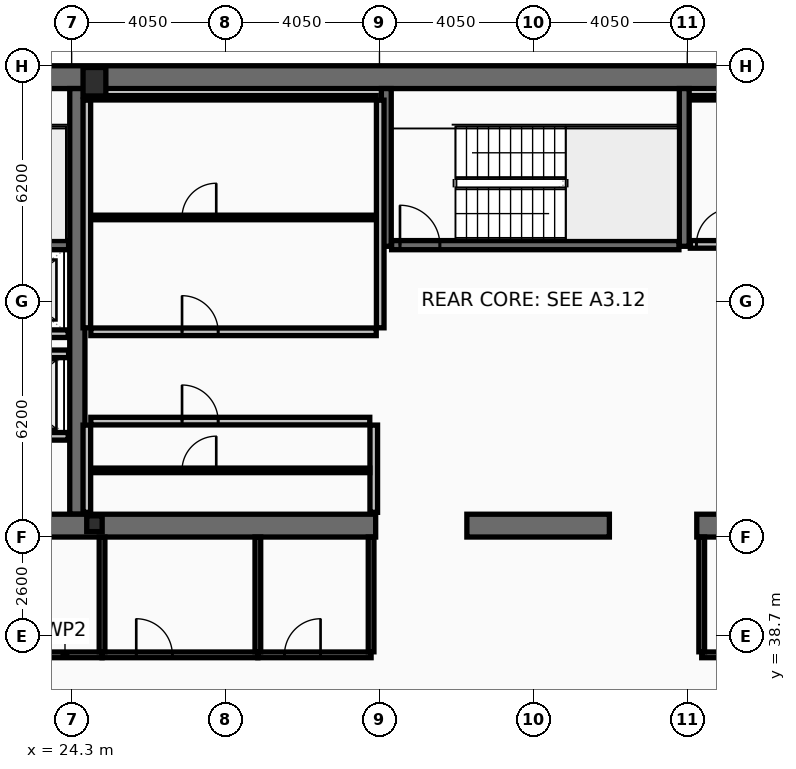
"""IFC4 building model, lengths in metres.
Left out: names, types, materials, properties, quantities, classifications, styles, units other than length and angle.
Written with IfcOpenShell. Run it as: python <this file> out.ifc"""

import sys

from ifc_helpers import new_model, si_unit, direction, frame, frame_2d, origin, origin_2d, place, context, subcontext, project, spatial, rectangle, hollow_rectangle, i_section, extrude, element, fill, save


model = new_model("IFC4")
c1 = context("Model", 3, precision=1e-05, world=origin(), true_north=direction((0.0, 1.0)))
c2 = subcontext(c1, "Body", "Model", "MODEL_VIEW")
j1 = project(units=[si_unit("LENGTHUNIT", "METRE"), si_unit("PLANEANGLEUNIT", "RADIAN")], contexts=[c1])
p1 = place(None, origin())
s1 = spatial("IfcSite", under=j1, at=p1, CompositionType="ELEMENT")
p2 = place(p1, origin())
s2 = spatial("IfcBuilding", under=s1, at=p2, CompositionType="ELEMENT")
p3 = place(p2, frame((0.0, 0.0, 210.2)))
s3 = spatial("IfcBuildingStorey", under=s2, at=p3, CompositionType="ELEMENT", Elevation=210.2)
p4 = place(p3, frame((16.2, 53.4, 0.0), z_axis=(0.0, 0.0, 1.0), x_axis=(1.0, 0.0, 0.0)))
e1 = element("IfcWall", 1, at=p4, inside=s3, PredefinedType="SHEAR", context=c2, shape_type="SweptSolid", body=[
    extrude(rectangle(XDim=40.5, YDim=0.6, at=frame_2d((20.25, 0.0))), origin(), (0.0, 0.0, 1.0), 3.44),
])
p5 = place(p3, frame((24.45, 41.9, 0.0), z_axis=(0.0, 0.0, 1.0), x_axis=(0.0, 1.0, 0.0)))
e2 = element("IfcWall", 2, at=p5, inside=s3, PredefinedType="SHEAR", context=c2, shape_type="SweptSolid", body=[
    extrude(rectangle(XDim=11.2, YDim=0.4, at=frame_2d((5.6, 0.0))), origin(), (0.0, 0.0, 1.0), 3.44),
])
p6 = place(p3, frame((32.3, 41.6, 0.0), z_axis=(0.0, 0.0, 1.0), x_axis=(-1.0, 0.0, 0.0)))
e3 = element("IfcWall", 3, at=p6, inside=s3, PredefinedType="SHEAR", context=c2, shape_type="SweptSolid", body=[
    extrude(rectangle(XDim=11.45, YDim=0.6, at=frame_2d((5.725, 0.0))), origin(), (0.0, 0.0, 1.0), 3.44),
])
p7 = place(p3, frame((38.45, 41.6, 0.0), z_axis=(0.0, 0.0, 1.0), x_axis=(-1.0, 0.0, 0.0)))
e4 = element("IfcWall", 4, at=p7, inside=s3, PredefinedType="SHEAR", context=c2, shape_type="SweptSolid", body=[
    extrude(rectangle(XDim=3.75, YDim=0.6, at=frame_2d((1.875, 0.0))), origin(), (0.0, 0.0, 1.0), 3.44),
])
p8 = place(p3, frame((52.05, 41.6, 0.0), z_axis=(0.0, 0.0, 1.0), x_axis=(-1.0, 0.0, 0.0)))
e5 = element("IfcWall", 5, at=p8, inside=s3, PredefinedType="SHEAR", context=c2, shape_type="SweptSolid", body=[
    extrude(rectangle(XDim=11.3, YDim=0.6, at=frame_2d((5.65, 0.0))), origin(), (0.0, 0.0, 1.0), 3.44),
])
for number, where, z_axis, x_axis in (
    (6, (32.58, 48.95, 0.0), (0.0, 0.0, 1.0), (0.0, 1.0, 0.0)),
    (7, (40.42, 48.95, 0.0), (0.0, 0.0, 1.0), (0.0, 1.0, 0.0)),
):
    element("IfcWall", number, at=place(p3, frame(where, z_axis=z_axis, x_axis=x_axis)), inside=s3, PredefinedType="SHEAR", context=c2, shape_type="SweptSolid", body=[
        extrude(rectangle(XDim=4.15, YDim=0.26, at=frame_2d((2.075, 0.0))), origin(), (0.0, 0.0, 1.0), 3.44),
    ])
p9 = place(p3, frame((16.8, 48.98, 0.0), z_axis=(0.0, 0.0, 1.0), x_axis=(1.0, 0.0, 0.0)))
e8 = element("IfcWall", 8, at=p9, inside=s3, PredefinedType="SHEAR", context=c2, shape_type="SweptSolid", body=[
    extrude(rectangle(XDim=7.42, YDim=0.24, at=frame_2d((3.71, 0.0))), origin(), (0.0, 0.0, 1.0), 3.44),
])
p10 = place(p9, frame((0.22, 0.0, 0.0)))
e9 = element("IfcOpeningElement", 9, at=p10, cuts=e8, PredefinedType="OPENING", context=c2, shape_type="SweptSolid", body=[
    extrude(rectangle(XDim=1.05, YDim=2.15, at=frame_2d((0.525, 1.075))), frame((0.0, 0.13, 0.0), z_axis=(0.0, -1.0, 0.0), x_axis=(1.0, 0.0, 0.0)), (0.0, 0.0, 1.0), 0.26),
])
p11 = place(p3, frame((32.72, 48.98, 0.0), z_axis=(0.0, 0.0, 1.0), x_axis=(1.0, 0.0, 0.0)))
e10 = element("IfcWall", 10, at=p11, inside=s3, PredefinedType="SHEAR", context=c2, shape_type="SweptSolid", body=[
    extrude(rectangle(XDim=7.56, YDim=0.24, at=frame_2d((3.78, 0.0))), origin(), (0.0, 0.0, 1.0), 3.44),
])
p12 = place(p11, frame((0.22, 0.0, 0.0)))
e11 = element("IfcOpeningElement", 11, at=p12, cuts=e10, PredefinedType="OPENING", context=c2, shape_type="SweptSolid", body=[
    extrude(rectangle(XDim=1.05, YDim=2.15, at=frame_2d((0.525, 1.075))), frame((0.0, 0.13, 0.0), z_axis=(0.0, -1.0, 0.0), x_axis=(1.0, 0.0, 0.0)), (0.0, 0.0, 1.0), 0.26),
])
p13 = place(p3, frame((24.9, 53.28, 0.0), z_axis=(0.0, 0.0, 1.0), x_axis=(1.0, 0.0, 0.0)))
e12 = element("IfcColumn", 12, at=p13, inside=s3, PredefinedType="COLUMN", context=c2, shape_type="SweptSolid", body=[
    extrude(hollow_rectangle(XDim=0.6, YDim=0.75, WallThickness=0.045, at=origin_2d()), origin(), (0.0, 0.0, 1.0), 3.6),
])
p14 = place(p3, frame((24.9, 41.65, 0.0), z_axis=(0.0, 0.0, 1.0), x_axis=(1.0, 0.0, 0.0)))
e13 = element("IfcColumn", 13, at=p14, inside=s3, PredefinedType="COLUMN", context=c2, shape_type="SweptSolid", body=[
    extrude(i_section(OverallWidth=0.406, OverallDepth=0.416, WebThickness=0.03, FlangeThickness=0.048, at=origin_2d()), origin(), (0.0, 0.0, 1.0), 3.6),
])
p15 = place(p3, frame((24.21, 43.95, 0.0), z_axis=(0.0, 0.0, 1.0), x_axis=(-1.0, 0.0, 0.0)))
e14 = element("IfcWall", 14, at=p15, inside=s3, PredefinedType="PARTITIONING", context=c2, shape_type="SweptSolid", body=[
    extrude(rectangle(XDim=2.97, YDim=0.2, at=frame_2d((1.485, 0.0))), origin(), (0.0, 0.0, 1.0), 3.44),
])
p16 = place(p15, frame((0.86, 0.0, 0.0)))
e15 = element("IfcOpeningElement", 15, at=p16, cuts=e14, PredefinedType="OPENING", context=c2, shape_type="SweptSolid", body=[
    extrude(rectangle(XDim=1.3, YDim=2.18, at=frame_2d((0.65, 1.09))), frame((0.0, 0.11, 0.0), z_axis=(0.0, -1.0, 0.0), x_axis=(1.0, 0.0, 0.0)), (0.0, 0.0, 1.0), 0.22),
])
p17 = place(p3, frame((24.21, 46.65, 0.0), z_axis=(0.0, 0.0, 1.0), x_axis=(-1.0, 0.0, 0.0)))
e16 = element("IfcWall", 16, at=p17, inside=s3, PredefinedType="PARTITIONING", context=c2, shape_type="SweptSolid", body=[
    extrude(rectangle(XDim=2.97, YDim=0.2, at=frame_2d((1.485, 0.0))), origin(), (0.0, 0.0, 1.0), 3.44),
])
p18 = place(p17, frame((0.91, 0.0, 0.0)))
e17 = element("IfcOpeningElement", 17, at=p18, cuts=e16, PredefinedType="OPENING", context=c2, shape_type="SweptSolid", body=[
    extrude(rectangle(XDim=1.2, YDim=2.18, at=frame_2d((0.6, 1.09))), frame((0.0, 0.11, 0.0), z_axis=(0.0, -1.0, 0.0), x_axis=(1.0, 0.0, 0.0)), (0.0, 0.0, 1.0), 0.22),
])
p19 = place(p3, frame((21.2, 46.12, 0.0), z_axis=(0.0, 0.0, 1.0), x_axis=(1.0, 0.0, 0.0)))
e18 = element("IfcWall", 18, at=p19, inside=s3, PredefinedType="PARTITIONING", context=c2, shape_type="SweptSolid", body=[
    extrude(rectangle(XDim=3.02, YDim=0.2, at=frame_2d((1.51, 0.0))), origin(), (0.0, 0.0, 1.0), 3.44),
])
for number, where, z_axis, x_axis in (
    (19, (24.7, 46.805, 0.0), (0.0, 0.0, 1.0), (0.0, 1.0, 0.0)),
    (20, (32.42, 46.805, 0.0), (0.0, 0.0, 1.0), (0.0, 1.0, 0.0)),
):
    element("IfcWall", number, at=place(p3, frame(where, z_axis=z_axis, x_axis=x_axis)), inside=s3, PredefinedType="PARTITIONING", context=c2, shape_type="SweptSolid", body=[
        extrude(rectangle(XDim=5.99, YDim=0.2, at=frame_2d((2.995, 0.0))), origin(), (0.0, 0.0, 1.0), 3.44),
    ])
p20 = place(p3, frame((24.805, 52.86, 0.0), z_axis=(0.0, 0.0, 1.0), x_axis=(1.0, 0.0, 0.0)))
e21 = element("IfcWall", 21, at=p20, inside=s3, PredefinedType="PARTITIONING", context=c2, shape_type="SweptSolid", body=[
    extrude(rectangle(XDim=7.51, YDim=0.12, at=frame_2d((3.755, 0.0))), origin(), (0.0, 0.0, 1.0), 3.44),
])
p21 = place(p3, frame((24.805, 49.709, 0.0), z_axis=(0.0, 0.0, 1.0), x_axis=(1.0, 0.0, 0.0)))
e22 = element("IfcWall", 22, at=p21, inside=s3, PredefinedType="PARTITIONING", context=c2, shape_type="SweptSolid", body=[
    extrude(rectangle(XDim=7.51, YDim=0.12, at=frame_2d((3.755, 0.0))), origin(), (0.0, 0.0, 1.0), 3.44),
])
p22 = place(p21, frame((2.4, 0.0, 0.0)))
e23 = element("IfcOpeningElement", 23, at=p22, cuts=e22, PredefinedType="OPENING", context=c2, shape_type="SweptSolid", body=[
    extrude(rectangle(XDim=0.9, YDim=2.05, at=frame_2d((0.45, 1.025))), frame((0.0, 0.07, 0.0), z_axis=(0.0, -1.0, 0.0), x_axis=(1.0, 0.0, 0.0)), (0.0, 0.0, 1.0), 0.14),
])
p23 = place(p3, frame((24.805, 46.7, 0.0), z_axis=(0.0, 0.0, 1.0), x_axis=(1.0, 0.0, 0.0)))
e24 = element("IfcWall", 24, at=p23, inside=s3, PredefinedType="PARTITIONING", context=c2, shape_type="SweptSolid", body=[
    extrude(rectangle(XDim=7.51, YDim=0.2, at=frame_2d((3.755, 0.0))), origin(), (0.0, 0.0, 1.0), 3.44),
])
p24 = place(p23, frame((2.4, 0.0, 0.0)))
e25 = element("IfcOpeningElement", 25, at=p24, cuts=e24, PredefinedType="OPENING", context=c2, shape_type="SweptSolid", body=[
    extrude(rectangle(XDim=0.95, YDim=2.1, at=frame_2d((0.475, 1.05))), frame((0.0, 0.11, 0.0), z_axis=(0.0, -1.0, 0.0), x_axis=(1.0, 0.0, 0.0)), (0.0, 0.0, 1.0), 0.22),
])
for number, where, z_axis, x_axis in (
    (26, (24.7, 41.95, 0.0), (0.0, 0.0, 1.0), (0.0, 1.0, 0.0)),
    (27, (32.25, 41.95, 0.0), (0.0, 0.0, 1.0), (0.0, 1.0, 0.0)),
):
    element("IfcWall", number, at=place(p3, frame(where, z_axis=z_axis, x_axis=x_axis)), inside=s3, PredefinedType="PARTITIONING", context=c2, shape_type="SweptSolid", body=[
        extrude(rectangle(XDim=2.295, YDim=0.2, at=frame_2d((1.147, 0.0))), origin(), (0.0, 0.0, 1.0), 3.44),
    ])
p25 = place(p3, frame((24.805, 43.054, 0.0), z_axis=(0.0, 0.0, 1.0), x_axis=(1.0, 0.0, 0.0)))
e28 = element("IfcWall", 28, at=p25, inside=s3, PredefinedType="PARTITIONING", context=c2, shape_type="SweptSolid", body=[
    extrude(rectangle(XDim=7.34, YDim=0.12, at=frame_2d((3.67, 0.0))), origin(), (0.0, 0.0, 1.0), 3.44),
])
p26 = place(p25, frame((2.4, 0.0, 0.0)))
e29 = element("IfcOpeningElement", 29, at=p26, cuts=e28, PredefinedType="OPENING", context=c2, shape_type="SweptSolid", body=[
    extrude(rectangle(XDim=0.9, YDim=2.05, at=frame_2d((0.45, 1.025))), frame((0.0, 0.07, 0.0), z_axis=(0.0, -1.0, 0.0), x_axis=(1.0, 0.0, 0.0)), (0.0, 0.0, 1.0), 0.14),
])
p27 = place(p3, frame((24.805, 44.35, 0.0), z_axis=(0.0, 0.0, 1.0), x_axis=(1.0, 0.0, 0.0)))
e30 = element("IfcWall", 30, at=p27, inside=s3, PredefinedType="PARTITIONING", context=c2, shape_type="SweptSolid", body=[
    extrude(rectangle(XDim=7.34, YDim=0.2, at=frame_2d((3.67, 0.0))), origin(), (0.0, 0.0, 1.0), 3.44),
])
p28 = place(p27, frame((2.4, 0.0, 0.0)))
e31 = element("IfcOpeningElement", 31, at=p28, cuts=e30, PredefinedType="OPENING", context=c2, shape_type="SweptSolid", body=[
    extrude(rectangle(XDim=0.95, YDim=2.1, at=frame_2d((0.475, 1.05))), frame((0.0, 0.11, 0.0), z_axis=(0.0, -1.0, 0.0), x_axis=(1.0, 0.0, 0.0)), (0.0, 0.0, 1.0), 0.22),
])
p29 = place(p3, frame((40.58, 52.86, 0.0), z_axis=(0.0, 0.0, 1.0), x_axis=(1.0, 0.0, 0.0)))
e32 = element("IfcWall", 32, at=p29, inside=s3, PredefinedType="PARTITIONING", context=c2, shape_type="SweptSolid", body=[
    extrude(rectangle(XDim=7.56, YDim=0.12, at=frame_2d((3.78, 0.0))), origin(), (0.0, 0.0, 1.0), 3.44),
])
p30 = place(p3, frame((40.58, 49.0, 0.0), z_axis=(0.0, 0.0, 1.0), x_axis=(1.0, 0.0, 0.0)))
e33 = element("IfcWall", 33, at=p30, inside=s3, PredefinedType="PARTITIONING", context=c2, shape_type="SweptSolid", body=[
    extrude(rectangle(XDim=7.56, YDim=0.2, at=frame_2d((3.78, 0.0))), origin(), (0.0, 0.0, 1.0), 3.44),
])
p31 = place(p30, frame((0.16, 0.0, 0.0)))
e34 = element("IfcOpeningElement", 34, at=p31, cuts=e33, PredefinedType="OPENING", context=c2, shape_type="SweptSolid", body=[
    extrude(rectangle(XDim=0.95, YDim=2.1, at=frame_2d((0.475, 1.05))), frame((0.0, 0.11, 0.0), z_axis=(0.0, -1.0, 0.0), x_axis=(1.0, 0.0, 0.0)), (0.0, 0.0, 1.0), 0.22),
])
p32 = place(p3, frame((20.95, 38.2, 0.0), z_axis=(0.0, 0.0, 1.0), x_axis=(1.0, 0.0, 0.0)))
e35 = element("IfcWall", 35, at=p32, inside=s3, PredefinedType="PARTITIONING", context=c2, shape_type="SweptSolid", body=[
    extrude(rectangle(XDim=4.15, YDim=0.15, at=frame_2d((2.075, 0.0))), origin(), (0.0, 0.0, 1.0), 2.73),
])
p33 = place(p32, frame((0.9, 0.0, 0.0)))
e36 = element("IfcOpeningElement", 36, at=p33, cuts=e35, PredefinedType="OPENING", context=c2, shape_type="SweptSolid", body=[
    extrude(rectangle(XDim=0.95, YDim=2.05, at=frame_2d((0.475, 1.025))), frame((0.0, 0.085, 0.0), z_axis=(0.0, -1.0, 0.0), x_axis=(1.0, 0.0, 0.0)), (0.0, 0.0, 1.0), 0.17),
])
p34 = place(p3, frame((25.1, 38.2, 0.0), z_axis=(0.0, 0.0, 1.0), x_axis=(1.0, 0.0, 0.0)))
e37 = element("IfcWall", 37, at=p34, inside=s3, PredefinedType="PARTITIONING", context=c2, shape_type="SweptSolid", body=[
    extrude(rectangle(XDim=4.1, YDim=0.15, at=frame_2d((2.05, 0.0))), origin(), (0.0, 0.0, 1.0), 2.73),
])
p35 = place(p34, frame((0.9, 0.0, 0.0)))
e38 = element("IfcOpeningElement", 38, at=p35, cuts=e37, PredefinedType="OPENING", context=c2, shape_type="SweptSolid", body=[
    extrude(rectangle(XDim=0.95, YDim=2.05, at=frame_2d((0.475, 1.025))), frame((0.0, 0.085, 0.0), z_axis=(0.0, -1.0, 0.0), x_axis=(1.0, 0.0, 0.0)), (0.0, 0.0, 1.0), 0.17),
])
p36 = place(p3, frame((29.2, 38.2, 0.0), z_axis=(0.0, 0.0, 1.0), x_axis=(1.0, 0.0, 0.0)))
e39 = element("IfcWall", 39, at=p36, inside=s3, PredefinedType="PARTITIONING", context=c2, shape_type="SweptSolid", body=[
    extrude(rectangle(XDim=2.98, YDim=0.15, at=frame_2d((1.49, 0.0))), origin(), (0.0, 0.0, 1.0), 2.73),
])
p37 = place(p36, frame((0.7, 0.0, 0.0)))
e40 = element("IfcOpeningElement", 40, at=p37, cuts=e39, PredefinedType="OPENING", context=c2, shape_type="SweptSolid", body=[
    extrude(rectangle(XDim=0.95, YDim=2.05, at=frame_2d((0.475, 1.025))), frame((0.0, 0.085, 0.0), z_axis=(0.0, -1.0, 0.0), x_axis=(1.0, 0.0, 0.0)), (0.0, 0.0, 1.0), 0.17),
])
p38 = place(p3, frame((25.1, 38.28, 0.0), z_axis=(0.0, 0.0, 1.0), x_axis=(0.0, 1.0, 0.0)))
e41 = element("IfcWall", 41, at=p38, inside=s3, PredefinedType="PARTITIONING", context=c2, shape_type="SweptSolid", body=[
    extrude(rectangle(XDim=3.02, YDim=0.15, at=frame_2d((1.51, 0.0))), origin(), (0.0, 0.0, 1.0), 2.73),
])
for number, where, z_axis, x_axis in (
    (42, (29.2, 38.28, 0.0), (0.0, 0.0, 1.0), (0.0, 1.0, 0.0)),
    (43, (32.18, 38.28, 0.0), (0.0, 0.0, 1.0), (0.0, 1.0, 0.0)),
):
    element("IfcWall", number, at=place(p3, frame(where, z_axis=z_axis, x_axis=x_axis)), inside=s3, PredefinedType="PARTITIONING", context=c2, shape_type="SweptSolid", body=[
        extrude(rectangle(XDim=3.02, YDim=0.15, at=frame_2d((1.51, 0.0))), origin(), (0.0, 0.0, 1.0), 3.44),
    ])
p39 = place(p3, frame((40.88, 38.2, 0.0), z_axis=(0.0, 0.0, 1.0), x_axis=(1.0, 0.0, 0.0)))
e44 = element("IfcWall", 44, at=p39, inside=s3, PredefinedType="PARTITIONING", context=c2, shape_type="SweptSolid", body=[
    extrude(rectangle(XDim=5.42, YDim=0.15, at=frame_2d((2.71, 0.0))), origin(), (0.0, 0.0, 1.0), 2.73),
])
p40 = place(p39, frame((1.1, 0.0, 0.0)))
e45 = element("IfcOpeningElement", 45, at=p40, cuts=e44, PredefinedType="OPENING", context=c2, shape_type="SweptSolid", body=[
    extrude(rectangle(XDim=0.9, YDim=2.05, at=frame_2d((0.45, 1.025))), frame((0.0, 0.085, 0.0), z_axis=(0.0, -1.0, 0.0), x_axis=(1.0, 0.0, 0.0)), (0.0, 0.0, 1.0), 0.17),
])
p41 = place(p3, frame((40.88, 38.28, 0.0), z_axis=(0.0, 0.0, 1.0), x_axis=(0.0, 1.0, 0.0)))
e46 = element("IfcWall", 46, at=p41, inside=s3, PredefinedType="PARTITIONING", context=c2, shape_type="SweptSolid", body=[
    extrude(rectangle(XDim=3.02, YDim=0.15, at=frame_2d((1.51, 0.0))), origin(), (0.0, 0.0, 1.0), 3.44),
])
p42 = place(p12, origin())
e47 = element("IfcDoor", 47, at=p42, inside=s3, OperationType="SINGLE_SWING_LEFT", PredefinedType="DOOR", context=c2, shape_type="SweptSolid", body=[
    extrude(rectangle(XDim=1.05, YDim=2.15, at=frame_2d((0.525, 1.075))), frame((0.0, 0.025, 0.0), z_axis=(0.0, -1.0, 0.0), x_axis=(1.0, 0.0, 0.0)), (0.0, 0.0, 1.0), 0.05),
])
fill(e11, e47)
p43 = place(p22, origin())
e48 = element("IfcDoor", 48, at=p43, inside=s3, OperationType="SINGLE_SWING_RIGHT", PredefinedType="DOOR", context=c2, shape_type="SweptSolid", body=[
    extrude(rectangle(XDim=0.9, YDim=2.05, at=frame_2d((0.45, 1.025))), frame((0.0, 0.025, 0.0), z_axis=(0.0, -1.0, 0.0), x_axis=(1.0, 0.0, 0.0)), (0.0, 0.0, 1.0), 0.05),
])
fill(e23, e48)
p44 = place(p24, origin())
e49 = element("IfcDoor", 49, at=p44, inside=s3, OperationType="SINGLE_SWING_LEFT", PredefinedType="DOOR", context=c2, shape_type="SweptSolid", body=[
    extrude(rectangle(XDim=0.95, YDim=2.1, at=frame_2d((0.475, 1.05))), frame((0.0, 0.025, 0.0), z_axis=(0.0, -1.0, 0.0), x_axis=(1.0, 0.0, 0.0)), (0.0, 0.0, 1.0), 0.05),
])
fill(e25, e49)
p45 = place(p26, origin())
e50 = element("IfcDoor", 50, at=p45, inside=s3, OperationType="SINGLE_SWING_RIGHT", PredefinedType="DOOR", context=c2, shape_type="SweptSolid", body=[
    extrude(rectangle(XDim=0.9, YDim=2.05, at=frame_2d((0.45, 1.025))), frame((0.0, 0.025, 0.0), z_axis=(0.0, -1.0, 0.0), x_axis=(1.0, 0.0, 0.0)), (0.0, 0.0, 1.0), 0.05),
])
fill(e29, e50)
p46 = place(p28, origin())
e51 = element("IfcDoor", 51, at=p46, inside=s3, OperationType="SINGLE_SWING_LEFT", PredefinedType="DOOR", context=c2, shape_type="SweptSolid", body=[
    extrude(rectangle(XDim=0.95, YDim=2.1, at=frame_2d((0.475, 1.05))), frame((0.0, 0.025, 0.0), z_axis=(0.0, -1.0, 0.0), x_axis=(1.0, 0.0, 0.0)), (0.0, 0.0, 1.0), 0.05),
])
fill(e31, e51)
p47 = place(p31, origin())
e52 = element("IfcDoor", 52, at=p47, inside=s3, OperationType="SINGLE_SWING_RIGHT", PredefinedType="DOOR", context=c2, shape_type="SweptSolid", body=[
    extrude(rectangle(XDim=0.95, YDim=2.1, at=frame_2d((0.475, 1.05))), frame((0.0, 0.025, 0.0), z_axis=(0.0, -1.0, 0.0), x_axis=(1.0, 0.0, 0.0)), (0.0, 0.0, 1.0), 0.05),
])
fill(e34, e52)
p48 = place(p35, origin())
e53 = element("IfcDoor", 53, at=p48, inside=s3, OperationType="SINGLE_SWING_LEFT", PredefinedType="DOOR", context=c2, shape_type="SweptSolid", body=[
    extrude(rectangle(XDim=0.95, YDim=2.05, at=frame_2d((0.475, 1.025))), frame((0.0, 0.025, 0.0), z_axis=(0.0, -1.0, 0.0), x_axis=(1.0, 0.0, 0.0)), (0.0, 0.0, 1.0), 0.05),
])
fill(e38, e53)
p49 = place(p37, origin())
e54 = element("IfcDoor", 54, at=p49, inside=s3, OperationType="SINGLE_SWING_RIGHT", PredefinedType="DOOR", context=c2, shape_type="SweptSolid", body=[
    extrude(rectangle(XDim=0.95, YDim=2.05, at=frame_2d((0.475, 1.025))), frame((0.0, 0.025, 0.0), z_axis=(0.0, -1.0, 0.0), x_axis=(1.0, 0.0, 0.0)), (0.0, 0.0, 1.0), 0.05),
])
fill(e40, e54)
save(model, sys.argv[1])
